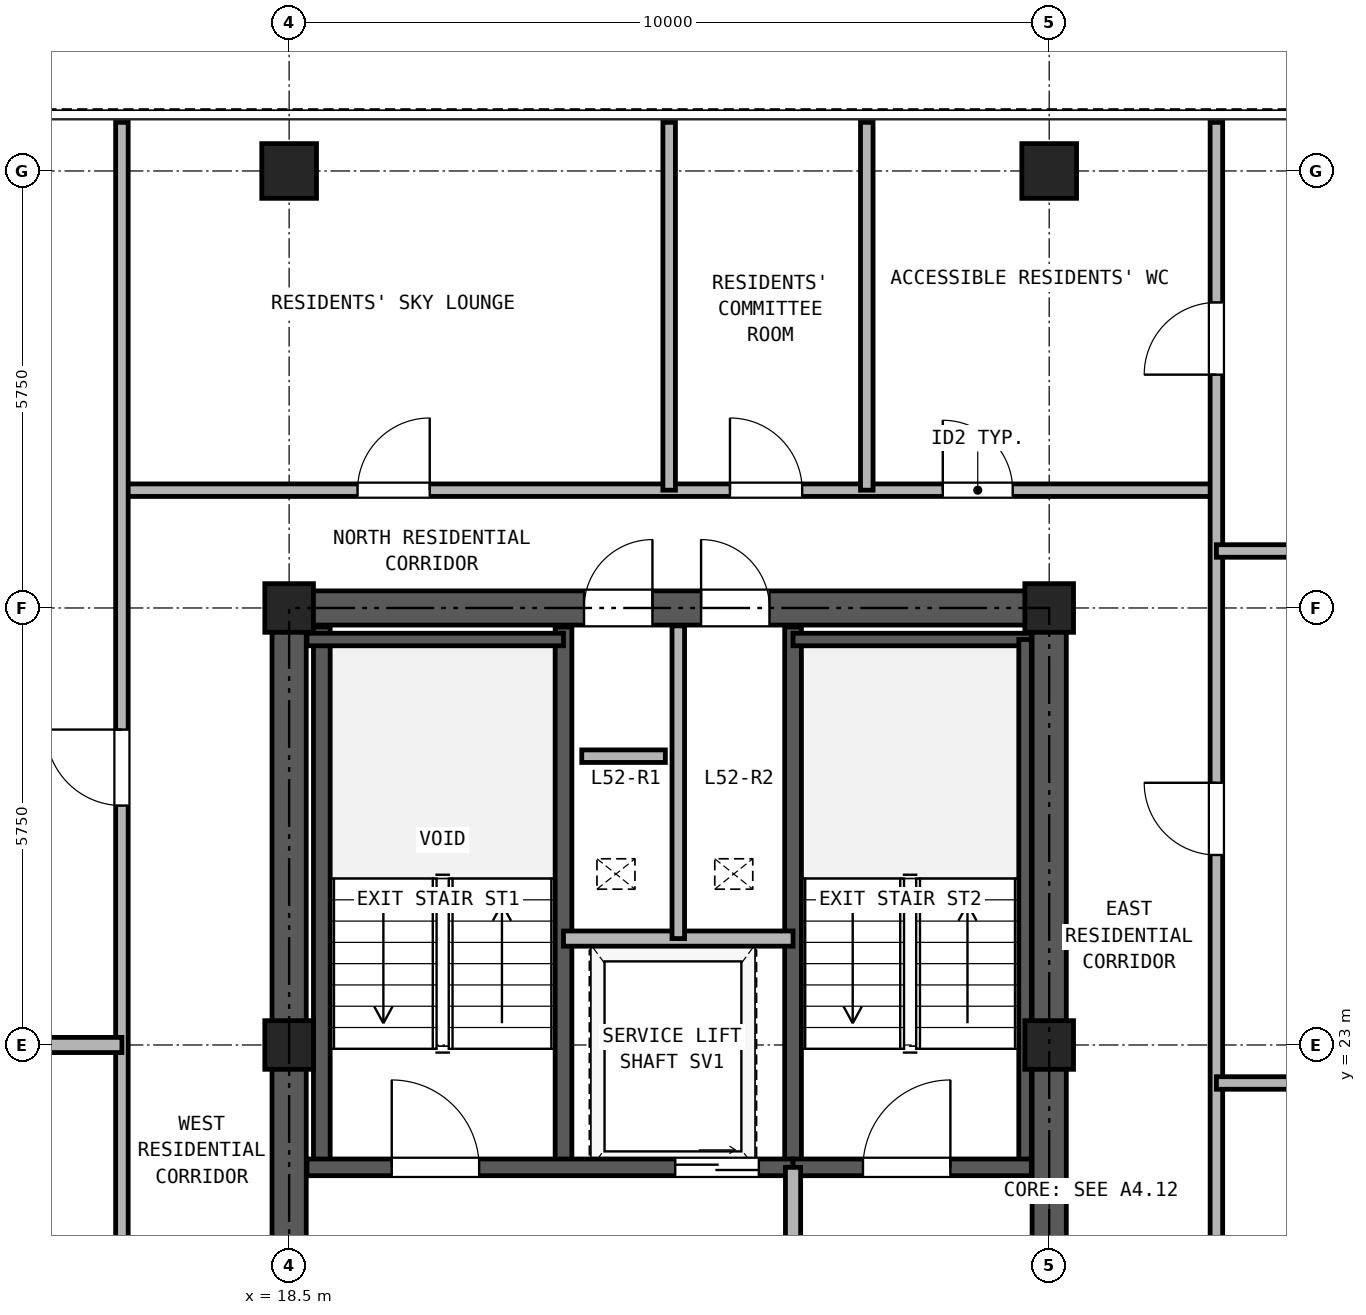
"""IFC4 building model, lengths in metres.
Left out: names, types, materials, properties, quantities, classifications, styles, units other than length and angle.
Written with IfcOpenShell. Run it as: python <this file> out.ifc"""

import sys

from ifc_helpers import new_model, si_unit, direction, frame, frame_2d, origin, origin_2d, place, context, subcontext, project, spatial, rectangle, hollow_rectangle, extrude, source, transform, mapped, element, fill, save


model = new_model("IFC4")
c1 = context("Model", 3, precision=1e-05, world=origin(), true_north=direction((0.0, 1.0)))
c2 = subcontext(c1, "Body", "Model", "MODEL_VIEW")
j1 = project(units=[si_unit("LENGTHUNIT", "METRE"), si_unit("PLANEANGLEUNIT", "RADIAN")], contexts=[c1])
p1 = place(None, origin())
s1 = spatial("IfcSite", under=j1, at=p1, CompositionType="ELEMENT")
p2 = place(p1, origin())
s2 = spatial("IfcBuilding", under=s1, at=p2, CompositionType="ELEMENT")
p3 = place(p2, frame((0.0, 0.0, 184.9)))
s3 = spatial("IfcBuildingStorey", under=s2, at=p3, CompositionType="ELEMENT", Elevation=184.9)
m1 = source(origin(), c2, "Body", "SweptSolid", [
    extrude(hollow_rectangle(XDim=0.72, YDim=0.72, WallThickness=0.04, at=origin_2d()), origin(), (0.0, 0.0, 1.0), 2.84),
])
for number, where, z_axis, x_axis in (
    (1, (18.5, 34.5, 0.0), (0.0, 0.0, 1.0), (1.0, 0.0, 0.0)),
    (2, (28.5, 34.5, 0.0), (0.0, 0.0, 1.0), (1.0, 0.0, 0.0)),
):
    element("IfcColumn", number, at=place(p3, frame(where, z_axis=z_axis, x_axis=x_axis)), inside=s3, PredefinedType="COLUMN", context=c2, shape_type="MappedRepresentation", body=[
        mapped(m1, transform((0.0, 0.0, 0.0), x_axis=(1.0, 0.0, 0.0), y_axis=(0.0, 1.0, 0.0), z_axis=(0.0, 0.0, 1.0), scale=1.0)),
    ])
m2 = source(origin(), c2, "Body", "SweptSolid", [
    extrude(hollow_rectangle(XDim=0.64, YDim=0.64, WallThickness=0.035, at=origin_2d()), origin(), (0.0, 0.0, 1.0), 2.84),
])
for number, where, z_axis, x_axis in (
    (3, (18.5, 23.0, 0.0), (0.0, 0.0, 1.0), (1.0, 0.0, 0.0)),
    (4, (18.5, 28.75, 0.0), (0.0, 0.0, 1.0), (1.0, 0.0, 0.0)),
    (5, (28.5, 23.0, 0.0), (0.0, 0.0, 1.0), (1.0, 0.0, 0.0)),
    (6, (28.5, 28.75, 0.0), (0.0, 0.0, 1.0), (1.0, 0.0, 0.0)),
):
    element("IfcColumn", number, at=place(p3, frame(where, z_axis=z_axis, x_axis=x_axis)), inside=s3, PredefinedType="COLUMN", context=c2, shape_type="MappedRepresentation", body=[
        mapped(m2, transform((0.0, 0.0, 0.0), x_axis=(1.0, 0.0, 0.0), y_axis=(0.0, 1.0, 0.0), z_axis=(0.0, 0.0, 1.0), scale=1.0)),
    ])
p4 = place(p3, frame((18.275, 28.75, 0.0), z_axis=(0.0, 0.0, 1.0), x_axis=(1.0, 0.0, 0.0)))
e7 = element("IfcWall", 7, at=p4, inside=s3, PredefinedType="SHEAR", context=c2, shape_type="SweptSolid", body=[
    extrude(rectangle(XDim=10.45, YDim=0.45, at=frame_2d((5.225, 0.0))), origin(), (0.0, 0.0, 1.0), 2.84),
])
p5 = place(p4, frame((4.105, 0.0, 0.0)))
e8 = element("IfcOpeningElement", 8, at=p5, cuts=e7, PredefinedType="OPENING", context=c2, shape_type="SweptSolid", body=[
    extrude(rectangle(XDim=0.9, YDim=2.05, at=frame_2d((0.45, 1.025))), frame((0.0, 0.235, 0.0), z_axis=(0.0, -1.0, 0.0), x_axis=(1.0, 0.0, 0.0)), (0.0, 0.0, 1.0), 0.47),
])
p6 = place(p4, frame((5.645, 0.0, 0.0)))
e9 = element("IfcOpeningElement", 9, at=p6, cuts=e7, PredefinedType="OPENING", context=c2, shape_type="SweptSolid", body=[
    extrude(rectangle(XDim=0.9, YDim=2.05, at=frame_2d((0.45, 1.025))), frame((0.0, 0.235, 0.0), z_axis=(0.0, -1.0, 0.0), x_axis=(1.0, 0.0, 0.0)), (0.0, 0.0, 1.0), 0.47),
])
p7 = place(p3, frame((18.5, 11.725, 0.0), z_axis=(0.0, 0.0, 1.0), x_axis=(0.0, 1.0, 0.0)))
e10 = element("IfcWall", 10, at=p7, inside=s3, PredefinedType="SHEAR", context=c2, shape_type="SweptSolid", body=[
    extrude(rectangle(XDim=16.8, YDim=0.45, at=frame_2d((8.4, 0.0))), origin(), (0.0, 0.0, 1.0), 2.84),
])
p8 = place(p7, frame((7.425, 0.0, 0.0)))
e11 = element("IfcOpeningElement", 11, at=p8, cuts=e10, PredefinedType="OPENING", context=c2, shape_type="SweptSolid", body=[
    extrude(rectangle(XDim=1.15, YDim=2.2, at=frame_2d((0.575, 1.1))), frame((0.0, 0.235, 0.0), z_axis=(0.0, -1.0, 0.0), x_axis=(1.0, 0.0, 0.0)), (0.0, 0.0, 1.0), 0.47),
])
p9 = place(p3, frame((28.5, 11.725, 0.0), z_axis=(0.0, 0.0, 1.0), x_axis=(0.0, 1.0, 0.0)))
e12 = element("IfcWall", 12, at=p9, inside=s3, PredefinedType="SHEAR", context=c2, shape_type="SweptSolid", body=[
    extrude(rectangle(XDim=16.8, YDim=0.45, at=frame_2d((8.4, 0.0))), origin(), (0.0, 0.0, 1.0), 2.84),
])
p10 = place(p9, frame((7.425, 0.0, 0.0)))
e13 = element("IfcOpeningElement", 13, at=p10, cuts=e12, PredefinedType="OPENING", context=c2, shape_type="SweptSolid", body=[
    extrude(rectangle(XDim=1.15, YDim=2.2, at=frame_2d((0.575, 1.1))), frame((0.0, 0.235, 0.0), z_axis=(0.0, -1.0, 0.0), x_axis=(1.0, 0.0, 0.0)), (0.0, 0.0, 1.0), 0.47),
])
for number, where, z_axis, x_axis in (
    (14, (18.93, 21.39, 0.0), (0.0, 0.0, 1.0), (0.0, 1.0, 0.0)),
    (15, (22.11, 21.39, 0.0), (0.0, 0.0, 1.0), (0.0, 1.0, 0.0)),
    (16, (25.13, 21.39, 0.0), (0.0, 0.0, 1.0), (0.0, 1.0, 0.0)),
):
    element("IfcWall", number, at=place(p3, frame(where, z_axis=z_axis, x_axis=x_axis)), inside=s3, PredefinedType="SOLIDWALL", context=c2, shape_type="SweptSolid", body=[
        extrude(rectangle(XDim=7.11, YDim=0.22, at=frame_2d((3.555, 0.0))), origin(), (0.0, 0.0, 1.0), 2.84),
    ])
p11 = place(p3, frame((18.735, 28.335, 0.0), z_axis=(0.0, 0.0, 1.0), x_axis=(1.0, 0.0, 0.0)))
e17 = element("IfcWall", 17, at=p11, inside=s3, PredefinedType="PARTITIONING", context=c2, shape_type="SweptSolid", body=[
    extrude(rectangle(XDim=3.375, YDim=0.165, at=frame_2d((1.688, 0.0))), origin(), (0.0, 0.0, 1.0), 2.84),
])
p12 = place(p3, frame((25.13, 28.335, 0.0), z_axis=(0.0, 0.0, 1.0), x_axis=(1.0, 0.0, 0.0)))
e18 = element("IfcWall", 18, at=p12, inside=s3, PredefinedType="PARTITIONING", context=c2, shape_type="SweptSolid", body=[
    extrude(rectangle(XDim=3.135, YDim=0.165, at=frame_2d((1.567, 0.0))), origin(), (0.0, 0.0, 1.0), 2.84),
])
p13 = place(p3, frame((28.183, 21.39, 0.0), z_axis=(0.0, 0.0, 1.0), x_axis=(0.0, 1.0, 0.0)))
e19 = element("IfcWall", 19, at=p13, inside=s3, PredefinedType="PARTITIONING", context=c2, shape_type="SweptSolid", body=[
    extrude(rectangle(XDim=6.945, YDim=0.165, at=frame_2d((3.473, 0.0))), origin(), (0.0, 0.0, 1.0), 2.84),
])
p14 = place(p3, frame((18.735, 21.39, 0.0), z_axis=(0.0, 0.0, 1.0), x_axis=(1.0, 0.0, 0.0)))
e20 = element("IfcWall", 20, at=p14, inside=s3, PredefinedType="SOLIDWALL", context=c2, shape_type="SweptSolid", body=[
    extrude(rectangle(XDim=6.395, YDim=0.22, at=frame_2d((3.197, 0.0))), origin(), (0.0, 0.0, 1.0), 2.84),
])
p15 = place(p14, frame((1.115, 0.0, 0.0)))
e21 = element("IfcOpeningElement", 21, at=p15, cuts=e20, PredefinedType="OPENING", context=c2, shape_type="SweptSolid", body=[
    extrude(rectangle(XDim=1.15, YDim=2.2, at=frame_2d((0.575, 1.1))), frame((0.0, 0.12, 0.0), z_axis=(0.0, -1.0, 0.0), x_axis=(1.0, 0.0, 0.0)), (0.0, 0.0, 1.0), 0.24),
])
p16 = place(p14, frame((4.845, 0.0, 0.0)))
e22 = element("IfcOpeningElement", 22, at=p16, cuts=e20, PredefinedType="OPENING", context=c2, shape_type="SweptSolid", body=[
    extrude(rectangle(XDim=1.1, YDim=2.25, at=frame_2d((0.55, 1.125))), frame((0.0, 0.12, 0.0), z_axis=(0.0, -1.0, 0.0), x_axis=(1.0, 0.0, 0.0)), (0.0, 0.0, 1.0), 0.24),
])
p17 = place(p3, frame((25.13, 21.39, 0.0), z_axis=(0.0, 0.0, 1.0), x_axis=(1.0, 0.0, 0.0)))
e23 = element("IfcWall", 23, at=p17, inside=s3, PredefinedType="SOLIDWALL", context=c2, shape_type="SweptSolid", body=[
    extrude(rectangle(XDim=3.135, YDim=0.22, at=frame_2d((1.567, 0.0))), origin(), (0.0, 0.0, 1.0), 2.84),
])
p18 = place(p17, frame((0.92, 0.0, 0.0)))
e24 = element("IfcOpeningElement", 24, at=p18, cuts=e23, PredefinedType="OPENING", context=c2, shape_type="SweptSolid", body=[
    extrude(rectangle(XDim=1.15, YDim=2.2, at=frame_2d((0.575, 1.1))), frame((0.0, 0.12, 0.0), z_axis=(0.0, -1.0, 0.0), x_axis=(1.0, 0.0, 0.0)), (0.0, 0.0, 1.0), 0.24),
])
p19 = place(p3, frame((22.11, 24.4, 0.0), z_axis=(0.0, 0.0, 1.0), x_axis=(1.0, 0.0, 0.0)))
e25 = element("IfcWall", 25, at=p19, inside=s3, PredefinedType="PARTITIONING", context=c2, shape_type="SweptSolid", body=[
    extrude(rectangle(XDim=3.02, YDim=0.2, at=frame_2d((1.51, 0.0))), origin(), (0.0, 0.0, 1.0), 2.84),
])
p20 = place(p3, frame((23.62, 24.4, 0.0), z_axis=(0.0, 0.0, 1.0), x_axis=(0.0, 1.0, 0.0)))
e26 = element("IfcWall", 26, at=p20, inside=s3, PredefinedType="PARTITIONING", context=c2, shape_type="SweptSolid", body=[
    extrude(rectangle(XDim=4.115, YDim=0.165, at=frame_2d((2.058, 0.0))), origin(), (0.0, 0.0, 1.0), 2.84),
])
p21 = place(p3, frame((25.13, 18.0, 0.0), z_axis=(0.0, 0.0, 1.0), x_axis=(0.0, 1.0, 0.0)))
e27 = element("IfcWall", 27, at=p21, inside=s3, PredefinedType="PARTITIONING", context=c2, shape_type="SweptSolid", body=[
    extrude(rectangle(XDim=3.39, YDim=0.2, at=frame_2d((1.695, 0.0))), origin(), (0.0, 0.0, 1.0), 2.84),
])
p22 = place(p21, frame((1.1, 0.0, 0.0)))
e28 = element("IfcOpeningElement", 28, at=p22, cuts=e27, PredefinedType="OPENING", context=c2, shape_type="SweptSolid", body=[
    extrude(rectangle(XDim=1.15, YDim=2.2, at=frame_2d((0.575, 1.1))), frame((0.0, 0.11, 0.0), z_axis=(0.0, -1.0, 0.0), x_axis=(1.0, 0.0, 0.0)), (0.0, 0.0, 1.0), 0.22),
])
p23 = place(p3, frame((16.3, 30.3, 0.0), z_axis=(0.0, 0.0, 1.0), x_axis=(1.0, 0.0, 0.0)))
e29 = element("IfcWall", 29, at=p23, inside=s3, PredefinedType="PARTITIONING", context=c2, shape_type="SweptSolid", body=[
    extrude(rectangle(XDim=14.4, YDim=0.165, at=frame_2d((7.2, 0.0))), origin(), (0.0, 0.0, 1.0), 2.84),
])
p24 = place(p23, frame((3.1, 0.0, 0.0)))
e30 = element("IfcOpeningElement", 30, at=p24, cuts=e29, PredefinedType="OPENING", context=c2, shape_type="SweptSolid", body=[
    extrude(rectangle(XDim=0.95, YDim=2.15, at=frame_2d((0.475, 1.075))), frame((0.0, 0.093, 0.0), z_axis=(0.0, -1.0, 0.0), x_axis=(1.0, 0.0, 0.0)), (0.0, 0.0, 1.0), 0.185),
])
p25 = place(p23, frame((8.0, 0.0, 0.0)))
e31 = element("IfcOpeningElement", 31, at=p25, cuts=e29, PredefinedType="OPENING", context=c2, shape_type="SweptSolid", body=[
    extrude(rectangle(XDim=0.95, YDim=2.15, at=frame_2d((0.475, 1.075))), frame((0.0, 0.093, 0.0), z_axis=(0.0, -1.0, 0.0), x_axis=(1.0, 0.0, 0.0)), (0.0, 0.0, 1.0), 0.185),
])
p26 = place(p23, frame((10.8, 0.0, 0.0)))
e32 = element("IfcOpeningElement", 32, at=p26, cuts=e29, PredefinedType="OPENING", context=c2, shape_type="SweptSolid", body=[
    extrude(rectangle(XDim=0.92, YDim=2.1, at=frame_2d((0.46, 1.05))), frame((0.0, 0.093, 0.0), z_axis=(0.0, -1.0, 0.0), x_axis=(1.0, 0.0, 0.0)), (0.0, 0.0, 1.0), 0.185),
])
p27 = place(p3, frame((16.3, 11.2, 0.0), z_axis=(0.0, 0.0, 1.0), x_axis=(0.0, 1.0, 0.0)))
e33 = element("IfcWall", 33, at=p27, inside=s3, PredefinedType="PARTITIONING", context=c2, shape_type="SweptSolid", body=[
    extrude(rectangle(XDim=23.94, YDim=0.165, at=frame_2d((11.97, 0.0))), origin(), (0.0, 0.0, 1.0), 2.84),
])
p28 = place(p27, frame((5.4, 0.0, 0.0)))
e34 = element("IfcOpeningElement", 34, at=p28, cuts=e33, PredefinedType="OPENING", context=c2, shape_type="SweptSolid", body=[
    extrude(rectangle(XDim=1.0, YDim=2.15, at=frame_2d((0.5, 1.075))), frame((0.0, 0.093, 0.0), z_axis=(0.0, -1.0, 0.0), x_axis=(1.0, 0.0, 0.0)), (0.0, 0.0, 1.0), 0.185),
])
p29 = place(p27, frame((14.95, 0.0, 0.0)))
e35 = element("IfcOpeningElement", 35, at=p29, cuts=e33, PredefinedType="OPENING", context=c2, shape_type="SweptSolid", body=[
    extrude(rectangle(XDim=1.0, YDim=2.15, at=frame_2d((0.5, 1.075))), frame((0.0, 0.093, 0.0), z_axis=(0.0, -1.0, 0.0), x_axis=(1.0, 0.0, 0.0)), (0.0, 0.0, 1.0), 0.185),
])
p30 = place(p3, frame((30.7, 11.2, 0.0), z_axis=(0.0, 0.0, 1.0), x_axis=(0.0, 1.0, 0.0)))
e36 = element("IfcWall", 36, at=p30, inside=s3, PredefinedType="PARTITIONING", context=c2, shape_type="SweptSolid", body=[
    extrude(rectangle(XDim=23.94, YDim=0.165, at=frame_2d((11.97, 0.0))), origin(), (0.0, 0.0, 1.0), 2.84),
])
p31 = place(p30, frame((5.15, 0.0, 0.0)))
e37 = element("IfcOpeningElement", 37, at=p31, cuts=e36, PredefinedType="OPENING", context=c2, shape_type="SweptSolid", body=[
    extrude(rectangle(XDim=0.95, YDim=2.15, at=frame_2d((0.475, 1.075))), frame((0.0, 0.093, 0.0), z_axis=(0.0, -1.0, 0.0), x_axis=(1.0, 0.0, 0.0)), (0.0, 0.0, 1.0), 0.185),
])
p32 = place(p30, frame((14.3, 0.0, 0.0)))
e38 = element("IfcOpeningElement", 38, at=p32, cuts=e36, PredefinedType="OPENING", context=c2, shape_type="SweptSolid", body=[
    extrude(rectangle(XDim=0.95, YDim=2.15, at=frame_2d((0.475, 1.075))), frame((0.0, 0.093, 0.0), z_axis=(0.0, -1.0, 0.0), x_axis=(1.0, 0.0, 0.0)), (0.0, 0.0, 1.0), 0.185),
])
p33 = place(p30, frame((20.62, 0.0, 0.0)))
e39 = element("IfcOpeningElement", 39, at=p33, cuts=e36, PredefinedType="OPENING", context=c2, shape_type="SweptSolid", body=[
    extrude(rectangle(XDim=0.95, YDim=2.15, at=frame_2d((0.475, 1.075))), frame((0.0, 0.093, 0.0), z_axis=(0.0, -1.0, 0.0), x_axis=(1.0, 0.0, 0.0)), (0.0, 0.0, 1.0), 0.185),
])
p34 = place(p3, frame((0.16, 23.0, 0.0), z_axis=(0.0, 0.0, 1.0), x_axis=(1.0, 0.0, 0.0)))
e40 = element("IfcWall", 40, at=p34, inside=s3, PredefinedType="PARTITIONING", context=c2, shape_type="SweptSolid", body=[
    extrude(rectangle(XDim=16.14, YDim=0.2, at=frame_2d((8.07, 0.0))), origin(), (0.0, 0.0, 1.0), 2.213),
])
for number, where, z_axis, x_axis in (
    (41, (30.7, 22.5, 0.0), (0.0, 0.0, 1.0), (1.0, 0.0, 0.0)),
    (42, (30.7, 29.5, 0.0), (0.0, 0.0, 1.0), (1.0, 0.0, 0.0)),
):
    element("IfcWall", number, at=place(p3, frame(where, z_axis=z_axis, x_axis=x_axis)), inside=s3, PredefinedType="PARTITIONING", context=c2, shape_type="SweptSolid", body=[
        extrude(rectangle(XDim=10.94, YDim=0.165, at=frame_2d((5.47, 0.0))), origin(), (0.0, 0.0, 1.0), 2.84),
    ])
for number, where, z_axis, x_axis in (
    (43, (23.5, 30.3, 0.0), (0.0, 0.0, 1.0), (0.0, 1.0, 0.0)),
    (44, (26.1, 30.3, 0.0), (0.0, 0.0, 1.0), (0.0, 1.0, 0.0)),
):
    element("IfcWall", number, at=place(p3, frame(where, z_axis=z_axis, x_axis=x_axis)), inside=s3, PredefinedType="PARTITIONING", context=c2, shape_type="SweptSolid", body=[
        extrude(rectangle(XDim=4.84, YDim=0.165, at=frame_2d((2.42, 0.0))), origin(), (0.0, 0.0, 1.0), 2.84),
    ])
p35 = place(p3, frame((22.35, 26.8, 0.0), z_axis=(0.0, 0.0, 1.0), x_axis=(1.0, 0.0, 0.0)))
e45 = element("IfcWall", 45, at=p35, inside=s3, PredefinedType="PARTITIONING", context=c2, shape_type="SweptSolid", body=[
    extrude(rectangle(XDim=1.1, YDim=0.165, at=frame_2d((0.55, 0.0))), origin(), (0.0, 0.0, 1.0), 2.84),
])
p36 = place(p15, frame((1.15, 0.0, 0.0), z_axis=(0.0, 0.0, 1.0), x_axis=(-1.0, 0.0, 0.0)))
e46 = element("IfcDoor", 46, at=p36, inside=s3, OperationType="SINGLE_SWING_LEFT", PredefinedType="DOOR", context=c2, shape_type="SweptSolid", body=[
    extrude(rectangle(XDim=1.15, YDim=2.2, at=frame_2d((0.575, 1.1))), frame((0.0, 0.025, 0.0), z_axis=(0.0, -1.0, 0.0), x_axis=(1.0, 0.0, 0.0)), (0.0, 0.0, 1.0), 0.05),
])
fill(e21, e46)
p37 = place(p18, frame((1.15, 0.0, 0.0), z_axis=(0.0, 0.0, 1.0), x_axis=(-1.0, 0.0, 0.0)))
e47 = element("IfcDoor", 47, at=p37, inside=s3, OperationType="SINGLE_SWING_RIGHT", PredefinedType="DOOR", context=c2, shape_type="SweptSolid", body=[
    extrude(rectangle(XDim=1.15, YDim=2.2, at=frame_2d((0.575, 1.1))), frame((0.0, 0.025, 0.0), z_axis=(0.0, -1.0, 0.0), x_axis=(1.0, 0.0, 0.0)), (0.0, 0.0, 1.0), 0.05),
])
fill(e24, e47)
p38 = place(p16, frame((1.1, 0.0, 0.0), z_axis=(0.0, 0.0, 1.0), x_axis=(-1.0, 0.0, 0.0)))
e48 = element("IfcDoor", 48, at=p38, inside=s3, OperationType="DOUBLE_DOOR_SLIDING", PredefinedType="DOOR", context=c2, shape_type="SweptSolid", body=[
    extrude(rectangle(XDim=1.1, YDim=2.25, at=frame_2d((0.55, 1.125))), frame((0.0, 0.025, 0.0), z_axis=(0.0, -1.0, 0.0), x_axis=(1.0, 0.0, 0.0)), (0.0, 0.0, 1.0), 0.05),
])
fill(e22, e48)
p39 = place(p5, origin())
e49 = element("IfcDoor", 49, at=p39, inside=s3, OperationType="SINGLE_SWING_RIGHT", PredefinedType="DOOR", context=c2, shape_type="SweptSolid", body=[
    extrude(rectangle(XDim=0.9, YDim=2.05, at=frame_2d((0.45, 1.025))), frame((0.0, 0.025, 0.0), z_axis=(0.0, -1.0, 0.0), x_axis=(1.0, 0.0, 0.0)), (0.0, 0.0, 1.0), 0.05),
])
fill(e8, e49)
p40 = place(p6, origin())
e50 = element("IfcDoor", 50, at=p40, inside=s3, OperationType="SINGLE_SWING_LEFT", PredefinedType="DOOR", context=c2, shape_type="SweptSolid", body=[
    extrude(rectangle(XDim=0.9, YDim=2.05, at=frame_2d((0.45, 1.025))), frame((0.0, 0.025, 0.0), z_axis=(0.0, -1.0, 0.0), x_axis=(1.0, 0.0, 0.0)), (0.0, 0.0, 1.0), 0.05),
])
fill(e9, e50)
p41 = place(p29, origin())
e51 = element("IfcDoor", 51, at=p41, inside=s3, OperationType="SINGLE_SWING_RIGHT", PredefinedType="DOOR", context=c2, shape_type="SweptSolid", body=[
    extrude(rectangle(XDim=1.0, YDim=2.15, at=frame_2d((0.5, 1.075))), frame((0.0, 0.025, 0.0), z_axis=(0.0, -1.0, 0.0), x_axis=(1.0, 0.0, 0.0)), (0.0, 0.0, 1.0), 0.05),
])
fill(e35, e51)
p42 = place(p32, origin())
e52 = element("IfcDoor", 52, at=p42, inside=s3, OperationType="SINGLE_SWING_RIGHT", PredefinedType="DOOR", context=c2, shape_type="SweptSolid", body=[
    extrude(rectangle(XDim=0.95, YDim=2.15, at=frame_2d((0.475, 1.075))), frame((0.0, 0.025, 0.0), z_axis=(0.0, -1.0, 0.0), x_axis=(1.0, 0.0, 0.0)), (0.0, 0.0, 1.0), 0.05),
])
fill(e38, e52)
p43 = place(p33, origin())
e53 = element("IfcDoor", 53, at=p43, inside=s3, OperationType="SINGLE_SWING_LEFT", PredefinedType="DOOR", context=c2, shape_type="SweptSolid", body=[
    extrude(rectangle(XDim=0.95, YDim=2.15, at=frame_2d((0.475, 1.075))), frame((0.0, 0.025, 0.0), z_axis=(0.0, -1.0, 0.0), x_axis=(1.0, 0.0, 0.0)), (0.0, 0.0, 1.0), 0.05),
])
fill(e39, e53)
p44 = place(p24, origin())
e54 = element("IfcDoor", 54, at=p44, inside=s3, OperationType="SINGLE_SWING_RIGHT", PredefinedType="DOOR", context=c2, shape_type="SweptSolid", body=[
    extrude(rectangle(XDim=0.95, YDim=2.15, at=frame_2d((0.475, 1.075))), frame((0.0, 0.025, 0.0), z_axis=(0.0, -1.0, 0.0), x_axis=(1.0, 0.0, 0.0)), (0.0, 0.0, 1.0), 0.05),
])
fill(e30, e54)
p45 = place(p25, origin())
e55 = element("IfcDoor", 55, at=p45, inside=s3, OperationType="SINGLE_SWING_LEFT", PredefinedType="DOOR", context=c2, shape_type="SweptSolid", body=[
    extrude(rectangle(XDim=0.95, YDim=2.15, at=frame_2d((0.475, 1.075))), frame((0.0, 0.025, 0.0), z_axis=(0.0, -1.0, 0.0), x_axis=(1.0, 0.0, 0.0)), (0.0, 0.0, 1.0), 0.05),
])
fill(e31, e55)
p46 = place(p26, origin())
e56 = element("IfcDoor", 56, at=p46, inside=s3, OperationType="SINGLE_SWING_LEFT", PredefinedType="DOOR", context=c2, shape_type="SweptSolid", body=[
    extrude(rectangle(XDim=0.92, YDim=2.1, at=frame_2d((0.46, 1.05))), frame((0.0, 0.025, 0.0), z_axis=(0.0, -1.0, 0.0), x_axis=(1.0, 0.0, 0.0)), (0.0, 0.0, 1.0), 0.05),
])
fill(e32, e56)
save(model, sys.argv[1])
